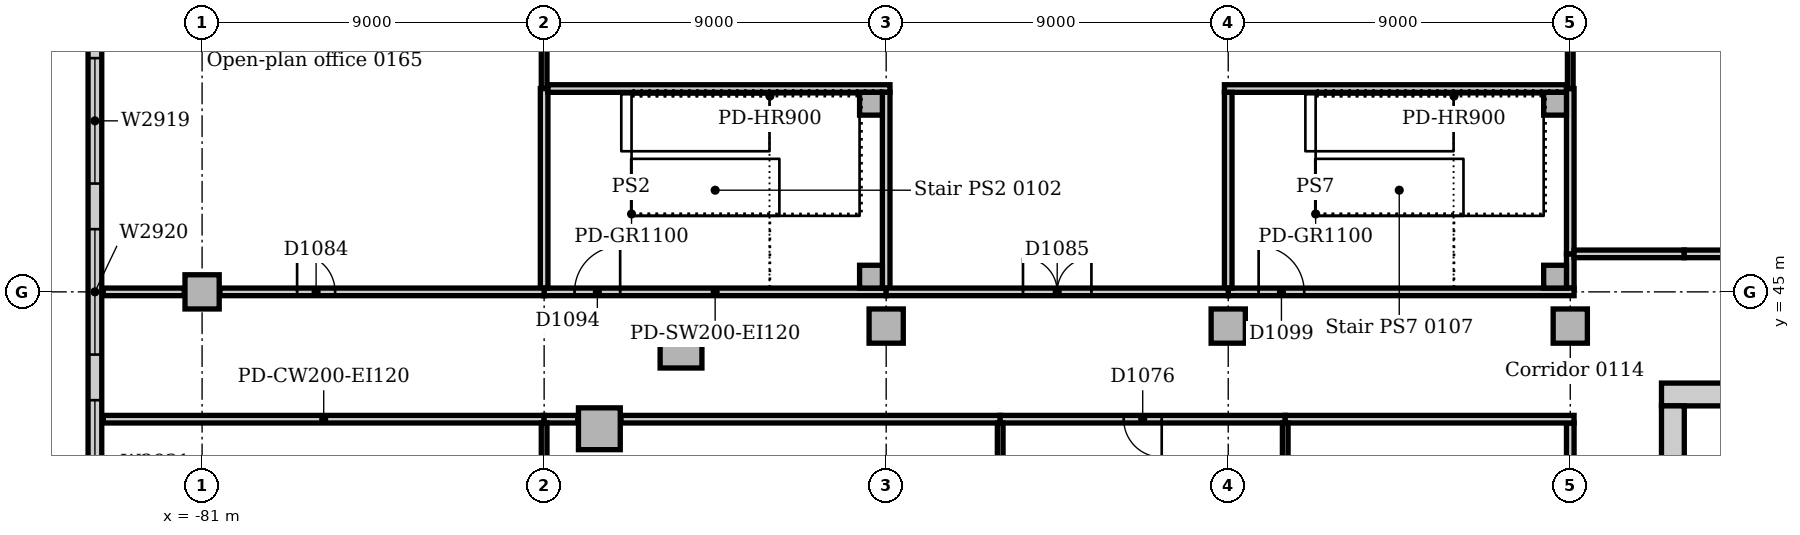
"""IFC4 building model, lengths in metres.
Left out: names, types, materials, properties, quantities, classifications, styles, units other than length and angle.
Written with IfcOpenShell. Run it as: python <this file> out.ifc"""

import sys

from ifc_helpers import new_model, si_unit, direction, frame, frame_2d, origin, origin_2d, place, context, subcontext, project, spatial, rectangle, extrude, element, fill, save


model = new_model("IFC4")
c1 = context("Model", 3, precision=1e-05, world=origin(), true_north=direction((0.0, 1.0)))
c2 = subcontext(c1, "Body", "Model", "MODEL_VIEW")
j1 = project(units=[si_unit("LENGTHUNIT", "METRE"), si_unit("PLANEANGLEUNIT", "RADIAN")], contexts=[c1])
p1 = place(None, origin())
s1 = spatial("IfcSite", under=j1, at=p1, CompositionType="ELEMENT")
p2 = place(p1, origin())
s2 = spatial("IfcBuilding", under=s1, at=p2, CompositionType="ELEMENT")
p3 = place(p2, frame((0.0, 0.0, 6.0)))
s3 = spatial("IfcBuildingStorey", under=s2, at=p3, CompositionType="ELEMENT", Elevation=6.0)
p4 = place(p3, frame((-30.9, 42.3, 0.0), z_axis=(0.0, 0.0, 1.0), x_axis=(-1.0, 0.0, 0.0)))
e1 = element("IfcWall", 1, at=p4, inside=s3, PredefinedType="SOLIDWALL", context=c2, shape_type="SweptSolid", body=[
    extrude(rectangle(XDim=11.7, YDim=0.6, at=frame_2d((5.85, 0.0))), origin(), (0.0, 0.0, 1.0), 5.0),
])
p5 = place(p3, frame((-42.3, 42.0, 0.0), z_axis=(0.0, 0.0, 1.0), x_axis=(0.0, -1.0, 0.0)))
e2 = element("IfcWall", 2, at=p5, inside=s3, PredefinedType="SOLIDWALL", context=c2, shape_type="SweptSolid", body=[
    extrude(rectangle(XDim=11.5, YDim=0.6, at=frame_2d((5.75, 0.0))), origin(), (0.0, 0.0, 1.0), 5.0),
])
p6 = place(p5, frame((8.85, 0.0, 0.0)))
e3 = element("IfcOpeningElement", 3, at=p6, cuts=e2, PredefinedType="OPENING", context=c2, shape_type="SweptSolid", body=[
    extrude(rectangle(XDim=1.8, YDim=2.1, at=frame_2d((0.9, 1.05))), frame((0.0, 0.31, 0.0), z_axis=(0.0, -1.0, 0.0), x_axis=(1.0, 0.0, 0.0)), (0.0, 0.0, 1.0), 0.62),
])
for number, where, z_axis, x_axis in (
    (4, (-68.398, 43.547, 0.0), (0.0, 0.0, 1.0), (1.0, 0.0, 0.0)),
    (5, (-70.547, 41.398, 0.0), (0.0, 0.0, 1.0), (1.0, 0.0, 0.0)),
):
    element("IfcColumn", number, at=place(p3, frame(where, z_axis=z_axis, x_axis=x_axis)), inside=s3, PredefinedType="COLUMN", context=c2, shape_type="SweptSolid", body=[
        extrude(rectangle(XDim=1.1, YDim=1.1, at=origin_2d()), origin(), (0.0, 0.0, 1.0), 4.7),
    ])
for number, where, z_axis, x_axis in (
    (6, (-63.0, 44.1, 0.0), (0.0, 0.0, 1.0), (1.0, 0.0, 0.0)),
    (7, (-54.0, 44.1, 0.0), (0.0, 0.0, 1.0), (1.0, 0.0, 0.0)),
    (8, (-45.0, 44.1, 0.0), (0.0, 0.0, 1.0), (1.0, 0.0, 0.0)),
    (9, (-81.0, 45.0, 0.0), (0.0, 0.0, 1.0), (1.0, 0.0, 0.0)),
):
    element("IfcColumn", number, at=place(p3, frame(where, z_axis=z_axis, x_axis=x_axis)), inside=s3, PredefinedType="COLUMN", context=c2, shape_type="SweptSolid", body=[
        extrude(rectangle(XDim=0.9, YDim=0.9, at=origin_2d()), origin(), (0.0, 0.0, 1.0), 4.7),
    ])
p7 = place(p3, frame((-83.82, 54.0, 0.0), z_axis=(0.0, 0.0, 1.0), x_axis=(0.0, -1.0, 0.0)))
e10 = element("IfcWall", 10, at=p7, inside=s3, PredefinedType="STANDARD", context=c2, shape_type="SweptSolid", body=[
    extrude(rectangle(XDim=63.0, YDim=0.36, at=frame_2d((31.5, 0.0))), origin(), (0.0, 0.0, 1.0), 4.7),
])
p8 = place(p7, frame((2.85, 0.0, 0.9)))
e11 = element("IfcOpeningElement", 11, at=p8, cuts=e10, PredefinedType="OPENING", context=c2, shape_type="SweptSolid", body=[
    extrude(rectangle(XDim=3.3, YDim=2.4, at=frame_2d((1.65, 1.2))), frame((0.0, 0.19, 0.0), z_axis=(0.0, -1.0, 0.0), x_axis=(1.0, 0.0, 0.0)), (0.0, 0.0, 1.0), 0.38),
])
p9 = place(p7, frame((7.35, 0.0, 0.9)))
e12 = element("IfcOpeningElement", 12, at=p9, cuts=e10, PredefinedType="OPENING", context=c2, shape_type="SweptSolid", body=[
    extrude(rectangle(XDim=3.3, YDim=2.4, at=frame_2d((1.65, 1.2))), frame((0.0, 0.19, 0.0), z_axis=(0.0, -1.0, 0.0), x_axis=(1.0, 0.0, 0.0)), (0.0, 0.0, 1.0), 0.38),
])
p10 = place(p7, frame((11.85, 0.0, 0.9)))
e13 = element("IfcOpeningElement", 13, at=p10, cuts=e10, PredefinedType="OPENING", context=c2, shape_type="SweptSolid", body=[
    extrude(rectangle(XDim=3.3, YDim=2.4, at=frame_2d((1.65, 1.2))), frame((0.0, 0.19, 0.0), z_axis=(0.0, -1.0, 0.0), x_axis=(1.0, 0.0, 0.0)), (0.0, 0.0, 1.0), 0.38),
])
p11 = place(p7, frame((16.35, 0.0, 0.9)))
e14 = element("IfcOpeningElement", 14, at=p11, cuts=e10, PredefinedType="OPENING", context=c2, shape_type="SweptSolid", body=[
    extrude(rectangle(XDim=3.3, YDim=2.4, at=frame_2d((1.65, 1.2))), frame((0.0, 0.19, 0.0), z_axis=(0.0, -1.0, 0.0), x_axis=(1.0, 0.0, 0.0)), (0.0, 0.0, 1.0), 0.38),
])
p12 = place(p7, frame((20.85, 0.0, 0.9)))
e15 = element("IfcOpeningElement", 15, at=p12, cuts=e10, PredefinedType="OPENING", context=c2, shape_type="SweptSolid", body=[
    extrude(rectangle(XDim=3.3, YDim=2.4, at=frame_2d((1.65, 1.2))), frame((0.0, 0.19, 0.0), z_axis=(0.0, -1.0, 0.0), x_axis=(1.0, 0.0, 0.0)), (0.0, 0.0, 1.0), 0.38),
])
p13 = place(p7, frame((25.35, 0.0, 0.9)))
e16 = element("IfcOpeningElement", 16, at=p13, cuts=e10, PredefinedType="OPENING", context=c2, shape_type="SweptSolid", body=[
    extrude(rectangle(XDim=3.3, YDim=2.4, at=frame_2d((1.65, 1.2))), frame((0.0, 0.19, 0.0), z_axis=(0.0, -1.0, 0.0), x_axis=(1.0, 0.0, 0.0)), (0.0, 0.0, 1.0), 0.38),
])
p14 = place(p7, frame((29.85, 0.0, 0.9)))
e17 = element("IfcOpeningElement", 17, at=p14, cuts=e10, PredefinedType="OPENING", context=c2, shape_type="SweptSolid", body=[
    extrude(rectangle(XDim=3.3, YDim=2.4, at=frame_2d((1.65, 1.2))), frame((0.0, 0.19, 0.0), z_axis=(0.0, -1.0, 0.0), x_axis=(1.0, 0.0, 0.0)), (0.0, 0.0, 1.0), 0.38),
])
p15 = place(p7, frame((34.35, 0.0, 0.9)))
e18 = element("IfcOpeningElement", 18, at=p15, cuts=e10, PredefinedType="OPENING", context=c2, shape_type="SweptSolid", body=[
    extrude(rectangle(XDim=3.3, YDim=2.4, at=frame_2d((1.65, 1.2))), frame((0.0, 0.19, 0.0), z_axis=(0.0, -1.0, 0.0), x_axis=(1.0, 0.0, 0.0)), (0.0, 0.0, 1.0), 0.38),
])
p16 = place(p7, frame((38.85, 0.0, 0.9)))
e19 = element("IfcOpeningElement", 19, at=p16, cuts=e10, PredefinedType="OPENING", context=c2, shape_type="SweptSolid", body=[
    extrude(rectangle(XDim=3.3, YDim=2.4, at=frame_2d((1.65, 1.2))), frame((0.0, 0.19, 0.0), z_axis=(0.0, -1.0, 0.0), x_axis=(1.0, 0.0, 0.0)), (0.0, 0.0, 1.0), 0.38),
])
p17 = place(p7, frame((43.35, 0.0, 0.9)))
e20 = element("IfcOpeningElement", 20, at=p17, cuts=e10, PredefinedType="OPENING", context=c2, shape_type="SweptSolid", body=[
    extrude(rectangle(XDim=3.3, YDim=2.4, at=frame_2d((1.65, 1.2))), frame((0.0, 0.19, 0.0), z_axis=(0.0, -1.0, 0.0), x_axis=(1.0, 0.0, 0.0)), (0.0, 0.0, 1.0), 0.38),
])
p18 = place(p7, frame((47.85, 0.0, 0.9)))
e21 = element("IfcOpeningElement", 21, at=p18, cuts=e10, PredefinedType="OPENING", context=c2, shape_type="SweptSolid", body=[
    extrude(rectangle(XDim=3.3, YDim=2.4, at=frame_2d((1.65, 1.2))), frame((0.0, 0.19, 0.0), z_axis=(0.0, -1.0, 0.0), x_axis=(1.0, 0.0, 0.0)), (0.0, 0.0, 1.0), 0.38),
])
p19 = place(p7, frame((52.35, 0.0, 0.9)))
e22 = element("IfcOpeningElement", 22, at=p19, cuts=e10, PredefinedType="OPENING", context=c2, shape_type="SweptSolid", body=[
    extrude(rectangle(XDim=3.3, YDim=2.4, at=frame_2d((1.65, 1.2))), frame((0.0, 0.19, 0.0), z_axis=(0.0, -1.0, 0.0), x_axis=(1.0, 0.0, 0.0)), (0.0, 0.0, 1.0), 0.38),
])
p20 = place(p7, frame((56.85, 0.0, 0.9)))
e23 = element("IfcOpeningElement", 23, at=p20, cuts=e10, PredefinedType="OPENING", context=c2, shape_type="SweptSolid", body=[
    extrude(rectangle(XDim=3.3, YDim=2.4, at=frame_2d((1.65, 1.2))), frame((0.0, 0.19, 0.0), z_axis=(0.0, -1.0, 0.0), x_axis=(1.0, 0.0, 0.0)), (0.0, 0.0, 1.0), 0.38),
])
for number, where, z_axis, x_axis in (
    (24, (-63.4, 49.95, 0.0), (0.0, 0.0, 1.0), (1.0, 0.0, 0.0)),
    (25, (-63.4, 45.4, 0.0), (0.0, 0.0, 1.0), (1.0, 0.0, 0.0)),
    (26, (-45.4, 49.95, 0.0), (0.0, 0.0, 1.0), (1.0, 0.0, 0.0)),
    (27, (-45.4, 45.4, 0.0), (0.0, 0.0, 1.0), (1.0, 0.0, 0.0)),
):
    element("IfcColumn", number, at=place(p3, frame(where, z_axis=z_axis, x_axis=x_axis)), inside=s3, PredefinedType="COLUMN", context=c2, shape_type="SweptSolid", body=[
        extrude(rectangle(XDim=0.6, YDim=0.6, at=origin_2d()), origin(), (0.0, 0.0, 1.0), 5.0),
    ])
p21 = place(p3, frame((-72.0, 45.0, 0.0), z_axis=(0.0, 0.0, 1.0), x_axis=(1.0, 0.0, 0.0)))
e28 = element("IfcWall", 28, at=p21, inside=s3, PredefinedType="SOLIDWALL", context=c2, shape_type="SweptSolid", body=[
    extrude(rectangle(XDim=9.0, YDim=0.2, at=frame_2d((4.5, 0.0))), origin(), (0.0, 0.0, 1.0), 4.7),
])
p22 = place(p21, frame((0.8, 0.0, 0.0)))
e29 = element("IfcOpeningElement", 29, at=p22, cuts=e28, PredefinedType="OPENING", context=c2, shape_type="SweptSolid", body=[
    extrude(rectangle(XDim=1.2, YDim=2.1, at=frame_2d((0.6, 1.05))), frame((0.0, 0.11, 0.0), z_axis=(0.0, -1.0, 0.0), x_axis=(1.0, 0.0, 0.0)), (0.0, 0.0, 1.0), 0.22),
])
p23 = place(p3, frame((-72.0, 45.1, 0.0), z_axis=(0.0, 0.0, 1.0), x_axis=(0.0, 1.0, 0.0)))
e30 = element("IfcWall", 30, at=p23, inside=s3, PredefinedType="SOLIDWALL", context=c2, shape_type="SweptSolid", body=[
    extrude(rectangle(XDim=5.25, YDim=0.2, at=frame_2d((2.625, 0.0))), origin(), (0.0, 0.0, 1.0), 4.7),
])
p24 = place(p3, frame((-71.9, 50.35, 0.0), z_axis=(0.0, 0.0, 1.0), x_axis=(1.0, 0.0, 0.0)))
e31 = element("IfcWall", 31, at=p24, inside=s3, PredefinedType="SOLIDWALL", context=c2, shape_type="SweptSolid", body=[
    extrude(rectangle(XDim=9.0, YDim=0.2, at=frame_2d((4.5, 0.0))), origin(), (0.0, 0.0, 1.0), 4.7),
])
p25 = place(p3, frame((-63.0, 45.1, 0.0), z_axis=(0.0, 0.0, 1.0), x_axis=(0.0, 1.0, 0.0)))
e32 = element("IfcWall", 32, at=p25, inside=s3, PredefinedType="SOLIDWALL", context=c2, shape_type="SweptSolid", body=[
    extrude(rectangle(XDim=5.15, YDim=0.2, at=frame_2d((2.575, 0.0))), origin(), (0.0, 0.0, 1.0), 4.7),
])
p26 = place(p3, frame((-45.0, 45.1, 0.0), z_axis=(0.0, 0.0, 1.0), x_axis=(0.0, 1.0, 0.0)))
e33 = element("IfcWall", 33, at=p26, inside=s3, PredefinedType="SOLIDWALL", context=c2, shape_type="SweptSolid", body=[
    extrude(rectangle(XDim=0.9, YDim=0.2, at=frame_2d((0.45, 0.0))), origin(), (0.0, 0.0, 1.0), 4.7),
])
p27 = place(p3, frame((-54.0, 45.0, 0.0), z_axis=(0.0, 0.0, 1.0), x_axis=(1.0, 0.0, 0.0)))
e34 = element("IfcWall", 34, at=p27, inside=s3, PredefinedType="SOLIDWALL", context=c2, shape_type="SweptSolid", body=[
    extrude(rectangle(XDim=9.1, YDim=0.2, at=frame_2d((4.55, 0.0))), origin(), (0.0, 0.0, 1.0), 4.7),
])
p28 = place(p27, frame((0.8, 0.0, 0.0)))
e35 = element("IfcOpeningElement", 35, at=p28, cuts=e34, PredefinedType="OPENING", context=c2, shape_type="SweptSolid", body=[
    extrude(rectangle(XDim=1.2, YDim=2.1, at=frame_2d((0.6, 1.05))), frame((0.0, 0.11, 0.0), z_axis=(0.0, -1.0, 0.0), x_axis=(1.0, 0.0, 0.0)), (0.0, 0.0, 1.0), 0.22),
])
p29 = place(p3, frame((-54.1, 50.35, 0.0), z_axis=(0.0, 0.0, 1.0), x_axis=(1.0, 0.0, 0.0)))
e36 = element("IfcWall", 36, at=p29, inside=s3, PredefinedType="SOLIDWALL", context=c2, shape_type="SweptSolid", body=[
    extrude(rectangle(XDim=9.0, YDim=0.2, at=frame_2d((4.5, 0.0))), origin(), (0.0, 0.0, 1.0), 4.7),
])
p30 = place(p3, frame((-54.0, 45.1, 0.0), z_axis=(0.0, 0.0, 1.0), x_axis=(0.0, 1.0, 0.0)))
e37 = element("IfcWall", 37, at=p30, inside=s3, PredefinedType="SOLIDWALL", context=c2, shape_type="SweptSolid", body=[
    extrude(rectangle(XDim=5.15, YDim=0.2, at=frame_2d((2.575, 0.0))), origin(), (0.0, 0.0, 1.0), 4.7),
])
p31 = place(p3, frame((-45.0, 46.0, 0.0), z_axis=(0.0, 0.0, 1.0), x_axis=(0.0, 1.0, 0.0)))
e38 = element("IfcWall", 38, at=p31, inside=s3, PredefinedType="SOLIDWALL", context=c2, shape_type="SweptSolid", body=[
    extrude(rectangle(XDim=4.35, YDim=0.2, at=frame_2d((2.175, 0.0))), origin(), (0.0, 0.0, 1.0), 4.7),
])
p32 = place(p3, frame((-45.0, 36.42, 0.0), z_axis=(0.0, 0.0, 1.0), x_axis=(0.0, 1.0, 0.0)))
e39 = element("IfcWall", 39, at=p32, inside=s3, PredefinedType="PARTITIONING", context=c2, shape_type="SweptSolid", body=[
    extrude(rectangle(XDim=5.13, YDim=0.2, at=frame_2d((2.565, 0.0))), origin(), (0.0, 0.0, 1.0), 4.7),
])
p33 = place(p3, frame((-83.6, 41.65, 0.0), z_axis=(0.0, 0.0, 1.0), x_axis=(1.0, 0.0, 0.0)))
e40 = element("IfcWall", 40, at=p33, inside=s3, PredefinedType="PARTITIONING", context=c2, shape_type="SweptSolid", body=[
    extrude(rectangle(XDim=11.6, YDim=0.2, at=frame_2d((5.8, 0.0))), origin(), (0.0, 0.0, 1.0), 4.7),
])
p34 = place(p3, frame((-72.0, 41.65, 0.0), z_axis=(0.0, 0.0, 1.0), x_axis=(1.0, 0.0, 0.0)))
e41 = element("IfcWall", 41, at=p34, inside=s3, PredefinedType="PARTITIONING", context=c2, shape_type="SweptSolid", body=[
    extrude(rectangle(XDim=0.883, YDim=0.2, at=frame_2d((0.442, 0.0))), origin(), (0.0, 0.0, 1.0), 4.7),
])
p35 = place(p3, frame((-69.977, 41.65, 0.0), z_axis=(0.0, 0.0, 1.0), x_axis=(1.0, 0.0, 0.0)))
e42 = element("IfcWall", 42, at=p35, inside=s3, PredefinedType="PARTITIONING", context=c2, shape_type="SweptSolid", body=[
    extrude(rectangle(XDim=9.977, YDim=0.2, at=frame_2d((4.989, 0.0))), origin(), (0.0, 0.0, 1.0), 4.7),
])
p36 = place(p3, frame((-60.0, 41.65, 0.0), z_axis=(0.0, 0.0, 1.0), x_axis=(1.0, 0.0, 0.0)))
e43 = element("IfcWall", 43, at=p36, inside=s3, PredefinedType="PARTITIONING", context=c2, shape_type="SweptSolid", body=[
    extrude(rectangle(XDim=7.5, YDim=0.2, at=frame_2d((3.75, 0.0))), origin(), (0.0, 0.0, 1.0), 4.7),
])
p37 = place(p36, frame((3.25, 0.0, 0.0)))
e44 = element("IfcOpeningElement", 44, at=p37, cuts=e43, PredefinedType="OPENING", context=c2, shape_type="SweptSolid", body=[
    extrude(rectangle(XDim=1.0, YDim=2.1, at=frame_2d((0.5, 1.05))), frame((0.0, 0.11, 0.0), z_axis=(0.0, -1.0, 0.0), x_axis=(1.0, 0.0, 0.0)), (0.0, 0.0, 1.0), 0.22),
])
p38 = place(p3, frame((-52.5, 41.65, 0.0), z_axis=(0.0, 0.0, 1.0), x_axis=(1.0, 0.0, 0.0)))
e45 = element("IfcWall", 45, at=p38, inside=s3, PredefinedType="PARTITIONING", context=c2, shape_type="SweptSolid", body=[
    extrude(rectangle(XDim=7.6, YDim=0.2, at=frame_2d((3.8, 0.0))), origin(), (0.0, 0.0, 1.0), 4.7),
])
p39 = place(p3, frame((-83.6, 45.0, 0.0), z_axis=(0.0, 0.0, 1.0), x_axis=(1.0, 0.0, 0.0)))
e46 = element("IfcWall", 46, at=p39, inside=s3, PredefinedType="PARTITIONING", context=c2, shape_type="SweptSolid", body=[
    extrude(rectangle(XDim=2.13, YDim=0.2, at=frame_2d((1.065, 0.0))), origin(), (0.0, 0.0, 1.0), 4.7),
])
p40 = place(p3, frame((-80.53, 45.0, 0.0), z_axis=(0.0, 0.0, 1.0), x_axis=(1.0, 0.0, 0.0)))
e47 = element("IfcWall", 47, at=p40, inside=s3, PredefinedType="PARTITIONING", context=c2, shape_type="SweptSolid", body=[
    extrude(rectangle(XDim=8.53, YDim=0.2, at=frame_2d((4.265, 0.0))), origin(), (0.0, 0.0, 1.0), 4.7),
])
p41 = place(p40, frame((2.03, 0.0, 0.0)))
e48 = element("IfcOpeningElement", 48, at=p41, cuts=e47, PredefinedType="OPENING", context=c2, shape_type="SweptSolid", body=[
    extrude(rectangle(XDim=1.0, YDim=2.1, at=frame_2d((0.5, 1.05))), frame((0.0, 0.11, 0.0), z_axis=(0.0, -1.0, 0.0), x_axis=(1.0, 0.0, 0.0)), (0.0, 0.0, 1.0), 0.22),
])
p42 = place(p3, frame((-63.0, 45.0, 0.0), z_axis=(0.0, 0.0, 1.0), x_axis=(1.0, 0.0, 0.0)))
e49 = element("IfcWall", 49, at=p42, inside=s3, PredefinedType="PARTITIONING", context=c2, shape_type="SweptSolid", body=[
    extrude(rectangle(XDim=9.0, YDim=0.2, at=frame_2d((4.5, 0.0))), origin(), (0.0, 0.0, 1.0), 4.7),
])
p43 = place(p42, frame((3.6, 0.0, 0.0)))
e50 = element("IfcOpeningElement", 50, at=p43, cuts=e49, PredefinedType="OPENING", context=c2, shape_type="SweptSolid", body=[
    extrude(rectangle(XDim=1.8, YDim=2.1, at=frame_2d((0.9, 1.05))), frame((0.0, 0.11, 0.0), z_axis=(0.0, -1.0, 0.0), x_axis=(1.0, 0.0, 0.0)), (0.0, 0.0, 1.0), 0.22),
])
p44 = place(p3, frame((-44.9, 46.0, 0.0), z_axis=(0.0, 0.0, 1.0), x_axis=(1.0, 0.0, 0.0)))
e51 = element("IfcWall", 51, at=p44, inside=s3, PredefinedType="PARTITIONING", context=c2, shape_type="SweptSolid", body=[
    extrude(rectangle(XDim=2.9, YDim=0.2, at=frame_2d((1.45, 0.0))), origin(), (0.0, 0.0, 1.0), 4.7),
])
p45 = place(p3, frame((-42.0, 46.0, 0.0), z_axis=(0.0, 0.0, 1.0), x_axis=(1.0, 0.0, 0.0)))
e52 = element("IfcWall", 52, at=p45, inside=s3, PredefinedType="PARTITIONING", context=c2, shape_type="SweptSolid", body=[
    extrude(rectangle(XDim=6.0, YDim=0.2, at=frame_2d((3.0, 0.0))), origin(), (0.0, 0.0, 1.0), 4.7),
])
p46 = place(p45, frame((2.5, 0.0, 0.0)))
e53 = element("IfcOpeningElement", 53, at=p46, cuts=e52, PredefinedType="OPENING", context=c2, shape_type="SweptSolid", body=[
    extrude(rectangle(XDim=1.0, YDim=2.1, at=frame_2d((0.5, 1.05))), frame((0.0, 0.11, 0.0), z_axis=(0.0, -1.0, 0.0), x_axis=(1.0, 0.0, 0.0)), (0.0, 0.0, 1.0), 0.22),
])
p47 = place(p3, frame((-72.0, 24.1, 0.0), z_axis=(0.0, 0.0, 1.0), x_axis=(0.0, 1.0, 0.0)))
e54 = element("IfcWall", 54, at=p47, inside=s3, PredefinedType="PARTITIONING", context=c2, shape_type="SweptSolid", body=[
    extrude(rectangle(XDim=17.45, YDim=0.15, at=frame_2d((8.725, 0.0))), origin(), (0.0, 0.0, 1.0), 4.7),
])
for number, where, z_axis, x_axis in (
    (55, (-60.0, 33.75, 0.0), (0.0, 0.0, 1.0), (0.0, 1.0, 0.0)),
    (56, (-52.5, 33.75, 0.0), (0.0, 0.0, 1.0), (0.0, 1.0, 0.0)),
):
    element("IfcWall", number, at=place(p3, frame(where, z_axis=z_axis, x_axis=x_axis)), inside=s3, PredefinedType="PARTITIONING", context=c2, shape_type="SweptSolid", body=[
        extrude(rectangle(XDim=7.8, YDim=0.15, at=frame_2d((3.9, 0.0))), origin(), (0.0, 0.0, 1.0), 4.7),
    ])
for number, where, z_axis, x_axis in (
    (57, (-72.0, 50.35, 0.0), (0.0, 0.0, 1.0), (0.0, 1.0, 0.0)),
    (58, (-45.0, 50.35, 0.0), (0.0, 0.0, 1.0), (0.0, 1.0, 0.0)),
):
    element("IfcWall", number, at=place(p3, frame(where, z_axis=z_axis, x_axis=x_axis)), inside=s3, PredefinedType="PARTITIONING", context=c2, shape_type="SweptSolid", body=[
        extrude(rectangle(XDim=3.18, YDim=0.15, at=frame_2d((1.59, 0.0))), origin(), (0.0, 0.0, 1.0), 4.7),
    ])
p48 = place(p8, origin())
e59 = element("IfcWindow", 59, at=p48, inside=s3, PartitioningType="SINGLE_PANEL", PredefinedType="WINDOW", context=c2, shape_type="SweptSolid", body=[
    extrude(rectangle(XDim=3.3, YDim=2.4, at=frame_2d((1.65, 1.2))), frame((0.0, 0.13, 0.0), z_axis=(0.0, -1.0, 0.0), x_axis=(1.0, 0.0, 0.0)), (0.0, 0.0, 1.0), 0.06),
])
fill(e11, e59)
p49 = place(p9, origin())
e60 = element("IfcWindow", 60, at=p49, inside=s3, PartitioningType="SINGLE_PANEL", PredefinedType="WINDOW", context=c2, shape_type="SweptSolid", body=[
    extrude(rectangle(XDim=3.3, YDim=2.4, at=frame_2d((1.65, 1.2))), frame((0.0, 0.13, 0.0), z_axis=(0.0, -1.0, 0.0), x_axis=(1.0, 0.0, 0.0)), (0.0, 0.0, 1.0), 0.06),
])
fill(e12, e60)
p50 = place(p10, origin())
e61 = element("IfcWindow", 61, at=p50, inside=s3, PartitioningType="SINGLE_PANEL", PredefinedType="WINDOW", context=c2, shape_type="SweptSolid", body=[
    extrude(rectangle(XDim=3.3, YDim=2.4, at=frame_2d((1.65, 1.2))), frame((0.0, 0.13, 0.0), z_axis=(0.0, -1.0, 0.0), x_axis=(1.0, 0.0, 0.0)), (0.0, 0.0, 1.0), 0.06),
])
fill(e13, e61)
p51 = place(p37, frame((1.0, 0.0, 0.0), z_axis=(0.0, 0.0, 1.0), x_axis=(-1.0, 0.0, 0.0)))
e62 = element("IfcDoor", 62, at=p51, inside=s3, OperationType="SINGLE_SWING_LEFT", PredefinedType="DOOR", context=c2, shape_type="SweptSolid", body=[
    extrude(rectangle(XDim=1.0, YDim=2.1, at=frame_2d((0.5, 1.05))), frame((0.0, 0.025, 0.0), z_axis=(0.0, -1.0, 0.0), x_axis=(1.0, 0.0, 0.0)), (0.0, 0.0, 1.0), 0.05),
])
fill(e44, e62)
p52 = place(p41, origin())
e63 = element("IfcDoor", 63, at=p52, inside=s3, OperationType="SINGLE_SWING_LEFT", PredefinedType="DOOR", context=c2, shape_type="SweptSolid", body=[
    extrude(rectangle(XDim=1.0, YDim=2.1, at=frame_2d((0.5, 1.05))), frame((0.0, 0.025, 0.0), z_axis=(0.0, -1.0, 0.0), x_axis=(1.0, 0.0, 0.0)), (0.0, 0.0, 1.0), 0.05),
])
fill(e48, e63)
p53 = place(p43, origin())
e64 = element("IfcDoor", 64, at=p53, inside=s3, OperationType="DOUBLE_DOOR_SINGLE_SWING", PredefinedType="DOOR", context=c2, shape_type="SweptSolid", body=[
    extrude(rectangle(XDim=1.8, YDim=2.1, at=frame_2d((0.9, 1.05))), frame((0.0, 0.025, 0.0), z_axis=(0.0, -1.0, 0.0), x_axis=(1.0, 0.0, 0.0)), (0.0, 0.0, 1.0), 0.05),
])
fill(e50, e64)
p54 = place(p22, origin())
e65 = element("IfcDoor", 65, at=p54, inside=s3, OperationType="SINGLE_SWING_RIGHT", PredefinedType="DOOR", context=c2, shape_type="SweptSolid", body=[
    extrude(rectangle(XDim=1.2, YDim=2.1, at=frame_2d((0.6, 1.05))), frame((0.0, 0.025, 0.0), z_axis=(0.0, -1.0, 0.0), x_axis=(1.0, 0.0, 0.0)), (0.0, 0.0, 1.0), 0.05),
])
fill(e29, e65)
p55 = place(p28, origin())
e66 = element("IfcDoor", 66, at=p55, inside=s3, OperationType="SINGLE_SWING_LEFT", PredefinedType="DOOR", context=c2, shape_type="SweptSolid", body=[
    extrude(rectangle(XDim=1.2, YDim=2.1, at=frame_2d((0.6, 1.05))), frame((0.0, 0.025, 0.0), z_axis=(0.0, -1.0, 0.0), x_axis=(1.0, 0.0, 0.0)), (0.0, 0.0, 1.0), 0.05),
])
fill(e35, e66)
save(model, sys.argv[1])
